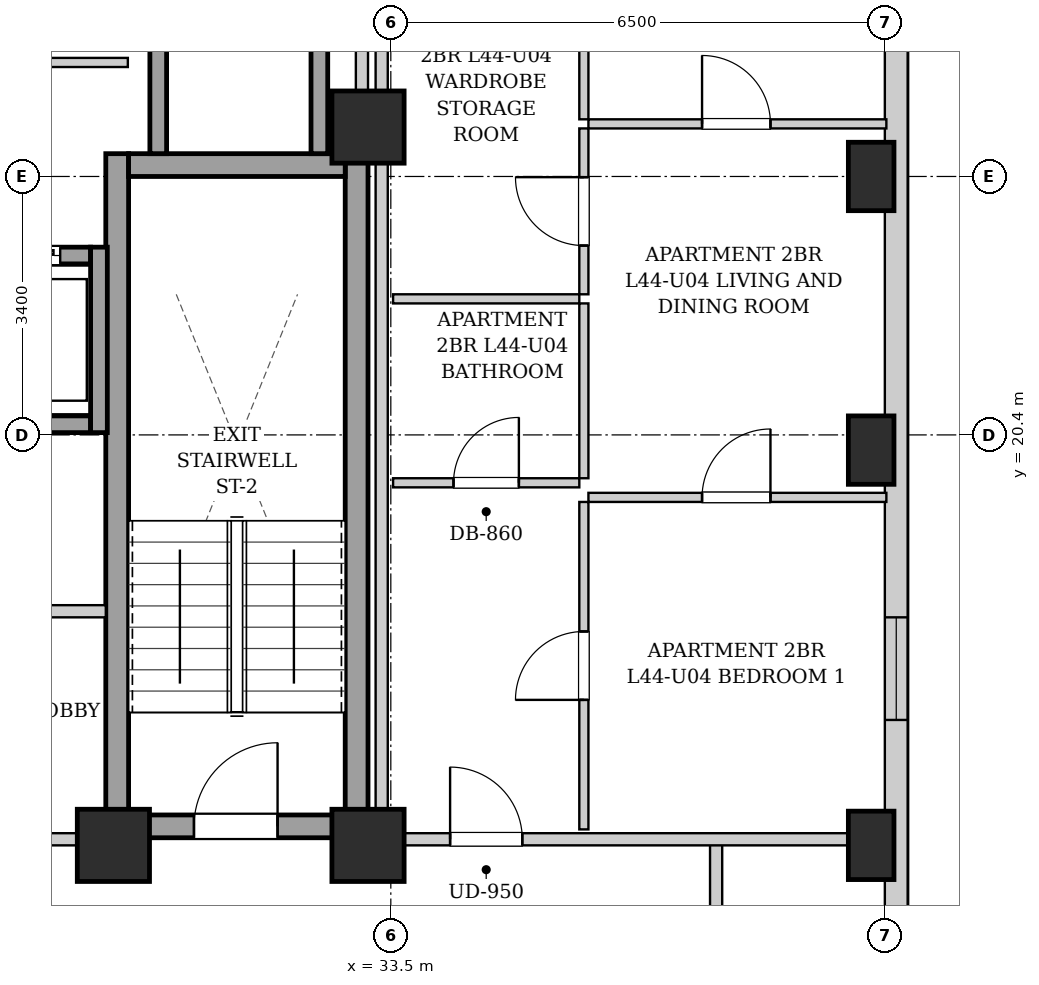
"""IFC4 building model, lengths in metres.
Left out: names, types, materials, properties, quantities, classifications, styles, units other than length and angle.
Written with IfcOpenShell. Run it as: python <this file> out.ifc"""

import sys

from ifc_helpers import new_model, si_unit, direction, frame, frame_2d, origin, origin_2d, place, context, subcontext, project, spatial, rectangle, extrude, element, fill, save


model = new_model("IFC4")
c1 = context("Model", 3, precision=1e-05, world=origin(), true_north=direction((0.0, 1.0)))
c2 = subcontext(c1, "Body", "Model", "MODEL_VIEW")
j1 = project(units=[si_unit("LENGTHUNIT", "METRE"), si_unit("PLANEANGLEUNIT", "RADIAN")], contexts=[c1])
p1 = place(None, origin())
s1 = spatial("IfcSite", under=j1, at=p1, CompositionType="ELEMENT")
p2 = place(p1, origin())
s2 = spatial("IfcBuilding", under=s1, at=p2, CompositionType="ELEMENT")
p3 = place(p2, frame((0.0, 0.0, 153.65)))
s3 = spatial("IfcBuildingStorey", under=s2, at=p3, CompositionType="ELEMENT", Elevation=153.65)
for number, where, z_axis, x_axis in (
    (1, (39.82, 15.0, 0.0), (0.0, 0.0, 1.0), (1.0, 0.0, 0.0)),
    (2, (39.82, 20.2, 0.0), (0.0, 0.0, 1.0), (1.0, 0.0, 0.0)),
    (3, (39.82, 23.8, 0.0), (0.0, 0.0, 1.0), (1.0, 0.0, 0.0)),
):
    element("IfcColumn", number, at=place(p3, frame(where, z_axis=z_axis, x_axis=x_axis)), inside=s3, PredefinedType="COLUMN", context=c2, shape_type="SweptSolid", body=[
        extrude(rectangle(XDim=0.6, YDim=0.9, at=origin_2d()), origin(), (0.0, 0.0, 1.0), 3.25),
    ])
for number, where, z_axis, x_axis in (
    (4, (29.85, 15.0, 0.0), (0.0, 0.0, 1.0), (1.0, 0.0, 0.0)),
    (5, (33.2, 15.0, 0.0), (0.0, 0.0, 1.0), (1.0, 0.0, 0.0)),
    (6, (33.2, 24.45, 0.0), (0.0, 0.0, 1.0), (1.0, 0.0, 0.0)),
):
    element("IfcColumn", number, at=place(p3, frame(where, z_axis=z_axis, x_axis=x_axis)), inside=s3, PredefinedType="COLUMN", context=c2, shape_type="SweptSolid", body=[
        extrude(rectangle(XDim=0.95, YDim=0.95, at=origin_2d()), origin(), (0.0, 0.0, 1.0), 3.25),
    ])
p4 = place(p3, frame((40.15, 40.8, 0.0), z_axis=(0.0, 0.0, 1.0), x_axis=(0.0, -1.0, 0.0)))
e7 = element("IfcWall", 7, at=p4, inside=s3, PredefinedType="SOLIDWALL", context=c2, shape_type="SweptSolid", body=[
    extrude(rectangle(XDim=34.5, YDim=0.3, at=frame_2d((17.25, 0.0))), origin(), (0.0, 0.0, 1.0), 2.99),
])
p5 = place(p4, frame((31.725, 0.0, 0.55)))
e8 = element("IfcOpeningElement", 8, at=p5, cuts=e7, PredefinedType="OPENING", context=c2, shape_type="SweptSolid", body=[
    extrude(rectangle(XDim=1.35, YDim=1.2, at=frame_2d((0.675, 0.6))), frame((0.0, 0.16, 0.0), z_axis=(0.0, -1.0, 0.0), x_axis=(1.0, 0.0, 0.0)), (0.0, 0.0, 1.0), 0.32),
])
p6 = place(p4, frame((22.8, 0.0, 0.55)))
e9 = element("IfcOpeningElement", 9, at=p6, cuts=e7, PredefinedType="OPENING", context=c2, shape_type="SweptSolid", body=[
    extrude(rectangle(XDim=1.35, YDim=1.2, at=frame_2d((0.675, 0.6))), frame((0.0, 0.16, 0.0), z_axis=(0.0, -1.0, 0.0), x_axis=(1.0, 0.0, 0.0)), (0.0, 0.0, 1.0), 0.32),
])
p7 = place(p4, frame((13.425, 0.0, 0.55)))
e10 = element("IfcOpeningElement", 10, at=p7, cuts=e7, PredefinedType="OPENING", context=c2, shape_type="SweptSolid", body=[
    extrude(rectangle(XDim=1.35, YDim=1.2, at=frame_2d((0.675, 0.6))), frame((0.0, 0.16, 0.0), z_axis=(0.0, -1.0, 0.0), x_axis=(1.0, 0.0, 0.0)), (0.0, 0.0, 1.0), 0.32),
])
for number, where, z_axis, x_axis in (
    (11, (29.9, 15.1, 0.0), (0.0, 0.0, 1.0), (0.0, 1.0, 0.0)),
    (12, (33.05, 15.1, 0.0), (0.0, 0.0, 1.0), (0.0, 1.0, 0.0)),
):
    element("IfcWall", number, at=place(p3, frame(where, z_axis=z_axis, x_axis=x_axis)), inside=s3, PredefinedType="SHEAR", context=c2, shape_type="SweptSolid", body=[
        extrude(rectangle(XDim=9.0, YDim=0.3, at=frame_2d((4.5, 0.0))), origin(), (0.0, 0.0, 1.0), 2.99),
    ])
p8 = place(p3, frame((30.05, 23.95, 0.0), z_axis=(0.0, 0.0, 1.0), x_axis=(1.0, 0.0, 0.0)))
e13 = element("IfcWall", 13, at=p8, inside=s3, PredefinedType="SHEAR", context=c2, shape_type="SweptSolid", body=[
    extrude(rectangle(XDim=2.85, YDim=0.3, at=frame_2d((1.425, 0.0))), origin(), (0.0, 0.0, 1.0), 2.99),
])
p9 = place(p3, frame((30.05, 15.25, 0.0), z_axis=(0.0, 0.0, 1.0), x_axis=(1.0, 0.0, 0.0)))
e14 = element("IfcWall", 14, at=p9, inside=s3, PredefinedType="SHEAR", context=c2, shape_type="SweptSolid", body=[
    extrude(rectangle(XDim=2.85, YDim=0.3, at=frame_2d((1.425, 0.0))), origin(), (0.0, 0.0, 1.0), 2.99),
])
p10 = place(p9, frame((0.86, 0.0, 0.0)))
e15 = element("IfcOpeningElement", 15, at=p10, cuts=e14, PredefinedType="OPENING", context=c2, shape_type="SweptSolid", body=[
    extrude(rectangle(XDim=1.1, YDim=2.05, at=frame_2d((0.55, 1.025))), frame((0.0, 0.16, 0.0), z_axis=(0.0, -1.0, 0.0), x_axis=(1.0, 0.0, 0.0)), (0.0, 0.0, 1.0), 0.32),
])
p11 = place(p3, frame((27.65, 20.54, 0.0), z_axis=(0.0, 0.0, 1.0), x_axis=(1.0, 0.0, 0.0)))
e16 = element("IfcWall", 16, at=p11, inside=s3, PredefinedType="SHEAR", context=c2, shape_type="SweptSolid", body=[
    extrude(rectangle(XDim=1.9, YDim=0.22, at=frame_2d((0.95, 0.0))), origin(), (0.0, 0.0, 1.0), 2.99),
])
p12 = place(p3, frame((27.65, 22.76, 0.0), z_axis=(0.0, 0.0, 1.0), x_axis=(1.0, 0.0, 0.0)))
e17 = element("IfcWall", 17, at=p12, inside=s3, PredefinedType="SHEAR", context=c2, shape_type="SweptSolid", body=[
    extrude(rectangle(XDim=1.9, YDim=0.22, at=frame_2d((0.95, 0.0))), origin(), (0.0, 0.0, 1.0), 2.99),
])
p13 = place(p12, frame((0.4, 0.0, 0.0)))
e18 = element("IfcOpeningElement", 18, at=p13, cuts=e17, PredefinedType="OPENING", context=c2, shape_type="SweptSolid", body=[
    extrude(rectangle(XDim=1.1, YDim=2.15, at=frame_2d((0.55, 1.075))), frame((0.0, 0.12, 0.0), z_axis=(0.0, -1.0, 0.0), x_axis=(1.0, 0.0, 0.0)), (0.0, 0.0, 1.0), 0.24),
])
p14 = place(p3, frame((29.66, 20.43, 0.0), z_axis=(0.0, 0.0, 1.0), x_axis=(0.0, 1.0, 0.0)))
e19 = element("IfcWall", 19, at=p14, inside=s3, PredefinedType="SHEAR", context=c2, shape_type="SweptSolid", body=[
    extrude(rectangle(XDim=2.44, YDim=0.22, at=frame_2d((1.22, 0.0))), origin(), (0.0, 0.0, 1.0), 2.99),
])
for number, where, z_axis, x_axis in (
    (20, (30.44, 24.1, 0.0), (0.0, 0.0, 1.0), (0.0, 1.0, 0.0)),
    (21, (32.56, 24.1, 0.0), (0.0, 0.0, 1.0), (0.0, 1.0, 0.0)),
):
    element("IfcWall", number, at=place(p3, frame(where, z_axis=z_axis, x_axis=x_axis)), inside=s3, PredefinedType="SHEAR", context=c2, shape_type="SweptSolid", body=[
        extrude(rectangle(XDim=2.07, YDim=0.22, at=frame_2d((1.035, 0.0))), origin(), (0.0, 0.0, 1.0), 2.99),
    ])
p15 = place(p3, frame((21.25, 15.08, 0.0), z_axis=(0.0, 0.0, 1.0), x_axis=(1.0, 0.0, 0.0)))
e22 = element("IfcWall", 22, at=p15, inside=s3, PredefinedType="PARTITIONING", context=c2, shape_type="SweptSolid", body=[
    extrude(rectangle(XDim=8.5, YDim=0.16, at=frame_2d((4.25, 0.0))), origin(), (0.0, 0.0, 1.0), 2.442),
])
p16 = place(p15, frame((3.725, 0.0, 0.0)))
e23 = element("IfcOpeningElement", 23, at=p16, cuts=e22, PredefinedType="OPENING", context=c2, shape_type="SweptSolid", body=[
    extrude(rectangle(XDim=1.05, YDim=2.05, at=frame_2d((0.525, 1.025))), frame((0.0, 0.09, 0.0), z_axis=(0.0, -1.0, 0.0), x_axis=(1.0, 0.0, 0.0)), (0.0, 0.0, 1.0), 0.18),
])
p17 = place(p3, frame((28.65, 18.08, 0.0), z_axis=(0.0, 0.0, 1.0), x_axis=(1.0, 0.0, 0.0)))
e24 = element("IfcWall", 24, at=p17, inside=s3, PredefinedType="PARTITIONING", context=c2, shape_type="SweptSolid", body=[
    extrude(rectangle(XDim=1.1, YDim=0.16, at=frame_2d((0.55, 0.0))), origin(), (0.0, 0.0, 1.0), 2.99),
])
p18 = place(p3, frame((33.12, 24.12, 0.0), z_axis=(0.0, 0.0, 1.0), x_axis=(0.0, 1.0, 0.0)))
e25 = element("IfcWall", 25, at=p18, inside=s3, PredefinedType="PARTITIONING", context=c2, shape_type="SweptSolid", body=[
    extrude(rectangle(XDim=4.76, YDim=0.16, at=frame_2d((2.38, 0.0))), origin(), (0.0, 0.0, 1.0), 2.99),
])
p19 = place(p3, frame((25.72, 25.3, 0.0), z_axis=(0.0, 0.0, 1.0), x_axis=(1.0, 0.0, 0.0)))
e26 = element("IfcWall", 26, at=p19, inside=s3, PredefinedType="PARTITIONING", context=c2, shape_type="SweptSolid", body=[
    extrude(rectangle(XDim=4.32, YDim=0.12, at=frame_2d((2.16, 0.0))), origin(), (0.0, 0.0, 1.0), 2.99),
])
p20 = place(p19, frame((1.65, 0.0, 0.0)))
e27 = element("IfcOpeningElement", 27, at=p20, cuts=e26, PredefinedType="OPENING", context=c2, shape_type="SweptSolid", body=[
    extrude(rectangle(XDim=0.9, YDim=2.05, at=frame_2d((0.45, 1.025))), frame((0.0, 0.07, 0.0), z_axis=(0.0, -1.0, 0.0), x_axis=(1.0, 0.0, 0.0)), (0.0, 0.0, 1.0), 0.14),
])
p21 = place(p3, frame((37.78, 13.35, 0.0), z_axis=(0.0, 0.0, 1.0), x_axis=(0.0, 1.0, 0.0)))
e28 = element("IfcWall", 28, at=p21, inside=s3, PredefinedType="PARTITIONING", context=c2, shape_type="SweptSolid", body=[
    extrude(rectangle(XDim=1.74, YDim=0.16, at=frame_2d((0.87, 0.0))), origin(), (0.0, 0.0, 1.0), 2.99),
])
p22 = place(p3, frame((33.38, 15.08, 0.0), z_axis=(0.0, 0.0, 1.0), x_axis=(1.0, 0.0, 0.0)))
e29 = element("IfcWall", 29, at=p22, inside=s3, PredefinedType="PARTITIONING", context=c2, shape_type="SweptSolid", body=[
    extrude(rectangle(XDim=6.64, YDim=0.16, at=frame_2d((3.32, 0.0))), origin(), (0.0, 0.0, 1.0), 2.442),
])
p23 = place(p22, frame((0.9, 0.0, 0.0)))
e30 = element("IfcOpeningElement", 30, at=p23, cuts=e29, PredefinedType="OPENING", context=c2, shape_type="SweptSolid", body=[
    extrude(rectangle(XDim=0.95, YDim=2.1, at=frame_2d((0.475, 1.05))), frame((0.0, 0.09, 0.0), z_axis=(0.0, -1.0, 0.0), x_axis=(1.0, 0.0, 0.0)), (0.0, 0.0, 1.0), 0.18),
])
p24 = place(p3, frame((33.53, 22.19, 0.0), z_axis=(0.0, 0.0, 1.0), x_axis=(1.0, 0.0, 0.0)))
e31 = element("IfcWall", 31, at=p24, inside=s3, PredefinedType="PARTITIONING", context=c2, shape_type="SweptSolid", body=[
    extrude(rectangle(XDim=2.45, YDim=0.12, at=frame_2d((1.225, 0.0))), origin(), (0.0, 0.0, 1.0), 2.99),
])
p25 = place(p3, frame((36.04, 22.25, 0.0), z_axis=(0.0, 0.0, 1.0), x_axis=(0.0, 1.0, 0.0)))
e32 = element("IfcWall", 32, at=p25, inside=s3, PredefinedType="PARTITIONING", context=c2, shape_type="SweptSolid", body=[
    extrude(rectangle(XDim=2.182, YDim=0.12, at=frame_2d((1.091, 0.0))), origin(), (0.0, 0.0, 1.0), 2.99),
])
p26 = place(p25, frame((0.641, 0.0, 0.0)))
e33 = element("IfcOpeningElement", 33, at=p26, cuts=e32, PredefinedType="OPENING", context=c2, shape_type="SweptSolid", body=[
    extrude(rectangle(XDim=0.9, YDim=2.05, at=frame_2d((0.45, 1.025))), frame((0.0, 0.07, 0.0), z_axis=(0.0, -1.0, 0.0), x_axis=(1.0, 0.0, 0.0)), (0.0, 0.0, 1.0), 0.14),
])
p27 = place(p3, frame((36.04, 24.552, 0.0), z_axis=(0.0, 0.0, 1.0), x_axis=(0.0, 1.0, 0.0)))
e34 = element("IfcWall", 34, at=p27, inside=s3, PredefinedType="PARTITIONING", context=c2, shape_type="SweptSolid", body=[
    extrude(rectangle(XDim=4.308, YDim=0.12, at=frame_2d((2.154, 0.0))), origin(), (0.0, 0.0, 1.0), 2.99),
])
p28 = place(p27, frame((1.704, 0.0, 0.0)))
e35 = element("IfcOpeningElement", 35, at=p28, cuts=e34, PredefinedType="OPENING", context=c2, shape_type="SweptSolid", body=[
    extrude(rectangle(XDim=0.9, YDim=2.05, at=frame_2d((0.45, 1.025))), frame((0.0, 0.07, 0.0), z_axis=(0.0, -1.0, 0.0), x_axis=(1.0, 0.0, 0.0)), (0.0, 0.0, 1.0), 0.14),
])
p29 = place(p3, frame((33.53, 19.77, 0.0), z_axis=(0.0, 0.0, 1.0), x_axis=(1.0, 0.0, 0.0)))
e36 = element("IfcWall", 36, at=p29, inside=s3, PredefinedType="PARTITIONING", context=c2, shape_type="SweptSolid", body=[
    extrude(rectangle(XDim=2.45, YDim=0.12, at=frame_2d((1.225, 0.0))), origin(), (0.0, 0.0, 1.0), 2.99),
])
p30 = place(p29, frame((0.795, 0.0, 0.0)))
e37 = element("IfcOpeningElement", 37, at=p30, cuts=e36, PredefinedType="OPENING", context=c2, shape_type="SweptSolid", body=[
    extrude(rectangle(XDim=0.86, YDim=2.05, at=frame_2d((0.43, 1.025))), frame((0.0, 0.07, 0.0), z_axis=(0.0, -1.0, 0.0), x_axis=(1.0, 0.0, 0.0)), (0.0, 0.0, 1.0), 0.14),
])
p31 = place(p3, frame((36.04, 19.83, 0.0), z_axis=(0.0, 0.0, 1.0), x_axis=(0.0, 1.0, 0.0)))
e38 = element("IfcWall", 38, at=p31, inside=s3, PredefinedType="PARTITIONING", context=c2, shape_type="SweptSolid", body=[
    extrude(rectangle(XDim=2.3, YDim=0.12, at=frame_2d((1.15, 0.0))), origin(), (0.0, 0.0, 1.0), 2.99),
])
p32 = place(p3, frame((36.04, 15.21, 0.0), z_axis=(0.0, 0.0, 1.0), x_axis=(0.0, 1.0, 0.0)))
e39 = element("IfcWall", 39, at=p32, inside=s3, PredefinedType="PARTITIONING", context=c2, shape_type="SweptSolid", body=[
    extrude(rectangle(XDim=4.308, YDim=0.12, at=frame_2d((2.154, 0.0))), origin(), (0.0, 0.0, 1.0), 2.99),
])
p33 = place(p32, frame((1.704, 0.0, 0.0)))
e40 = element("IfcOpeningElement", 40, at=p33, cuts=e39, PredefinedType="OPENING", context=c2, shape_type="SweptSolid", body=[
    extrude(rectangle(XDim=0.9, YDim=2.05, at=frame_2d((0.45, 1.025))), frame((0.0, 0.07, 0.0), z_axis=(0.0, -1.0, 0.0), x_axis=(1.0, 0.0, 0.0)), (0.0, 0.0, 1.0), 0.14),
])
p34 = place(p3, frame((36.1, 19.578, 0.0), z_axis=(0.0, 0.0, 1.0), x_axis=(1.0, 0.0, 0.0)))
e41 = element("IfcWall", 41, at=p34, inside=s3, PredefinedType="PARTITIONING", context=c2, shape_type="SweptSolid", body=[
    extrude(rectangle(XDim=3.92, YDim=0.12, at=frame_2d((1.96, 0.0))), origin(), (0.0, 0.0, 1.0), 2.99),
])
p35 = place(p34, frame((1.495, 0.0, 0.0)))
e42 = element("IfcOpeningElement", 42, at=p35, cuts=e41, PredefinedType="OPENING", context=c2, shape_type="SweptSolid", body=[
    extrude(rectangle(XDim=0.9, YDim=2.05, at=frame_2d((0.45, 1.025))), frame((0.0, 0.07, 0.0), z_axis=(0.0, -1.0, 0.0), x_axis=(1.0, 0.0, 0.0)), (0.0, 0.0, 1.0), 0.14),
])
p36 = place(p3, frame((36.1, 24.492, 0.0), z_axis=(0.0, 0.0, 1.0), x_axis=(1.0, 0.0, 0.0)))
e43 = element("IfcWall", 43, at=p36, inside=s3, PredefinedType="PARTITIONING", context=c2, shape_type="SweptSolid", body=[
    extrude(rectangle(XDim=3.92, YDim=0.12, at=frame_2d((1.96, 0.0))), origin(), (0.0, 0.0, 1.0), 2.621),
])
p37 = place(p36, frame((1.495, 0.0, 0.0)))
e44 = element("IfcOpeningElement", 44, at=p37, cuts=e43, PredefinedType="OPENING", context=c2, shape_type="SweptSolid", body=[
    extrude(rectangle(XDim=0.9, YDim=2.05, at=frame_2d((0.45, 1.025))), frame((0.0, 0.07, 0.0), z_axis=(0.0, -1.0, 0.0), x_axis=(1.0, 0.0, 0.0)), (0.0, 0.0, 1.0), 0.14),
])
p38 = place(p3, frame((33.38, 15.02, 0.0), z_axis=(0.0, 0.0, 1.0), x_axis=(0.0, 1.0, 0.0)))
e45 = element("IfcWall", 45, at=p38, inside=s3, PredefinedType="PARTITIONING", context=c2, shape_type="SweptSolid", body=[
    extrude(rectangle(XDim=13.98, YDim=0.16, at=frame_2d((6.99, 0.0))), origin(), (0.0, 0.0, 1.0), 2.99),
])
p39 = place(p10, origin())
e46 = element("IfcDoor", 46, at=p39, inside=s3, OperationType="SINGLE_SWING_RIGHT", PredefinedType="DOOR", context=c2, shape_type="SweptSolid", body=[
    extrude(rectangle(XDim=1.1, YDim=2.05, at=frame_2d((0.55, 1.025))), frame((0.0, 0.025, 0.0), z_axis=(0.0, -1.0, 0.0), x_axis=(1.0, 0.0, 0.0)), (0.0, 0.0, 1.0), 0.05),
])
fill(e15, e46)
p40 = place(p13, origin())
e47 = element("IfcDoor", 47, at=p40, inside=s3, OperationType="SLIDING_TO_LEFT", PredefinedType="DOOR", context=c2, shape_type="SweptSolid", body=[
    extrude(rectangle(XDim=1.1, YDim=2.15, at=frame_2d((0.55, 1.075))), frame((0.0, 0.025, 0.0), z_axis=(0.0, -1.0, 0.0), x_axis=(1.0, 0.0, 0.0)), (0.0, 0.0, 1.0), 0.05),
])
fill(e18, e47)
p41 = place(p23, origin())
e48 = element("IfcDoor", 48, at=p41, inside=s3, OperationType="SINGLE_SWING_LEFT", PredefinedType="DOOR", context=c2, shape_type="SweptSolid", body=[
    extrude(rectangle(XDim=0.95, YDim=2.1, at=frame_2d((0.475, 1.05))), frame((0.0, 0.025, 0.0), z_axis=(0.0, -1.0, 0.0), x_axis=(1.0, 0.0, 0.0)), (0.0, 0.0, 1.0), 0.05),
])
fill(e30, e48)
p42 = place(p26, origin())
e49 = element("IfcDoor", 49, at=p42, inside=s3, OperationType="SINGLE_SWING_RIGHT", PredefinedType="DOOR", context=c2, shape_type="SweptSolid", body=[
    extrude(rectangle(XDim=0.9, YDim=2.05, at=frame_2d((0.45, 1.025))), frame((0.0, 0.025, 0.0), z_axis=(0.0, -1.0, 0.0), x_axis=(1.0, 0.0, 0.0)), (0.0, 0.0, 1.0), 0.05),
])
fill(e33, e49)
p43 = place(p30, origin())
e50 = element("IfcDoor", 50, at=p43, inside=s3, OperationType="SINGLE_SWING_RIGHT", PredefinedType="DOOR", context=c2, shape_type="SweptSolid", body=[
    extrude(rectangle(XDim=0.86, YDim=2.05, at=frame_2d((0.43, 1.025))), frame((0.0, 0.025, 0.0), z_axis=(0.0, -1.0, 0.0), x_axis=(1.0, 0.0, 0.0)), (0.0, 0.0, 1.0), 0.05),
])
fill(e37, e50)
p44 = place(p33, origin())
e51 = element("IfcDoor", 51, at=p44, inside=s3, OperationType="SINGLE_SWING_LEFT", PredefinedType="DOOR", context=c2, shape_type="SweptSolid", body=[
    extrude(rectangle(XDim=0.9, YDim=2.05, at=frame_2d((0.45, 1.025))), frame((0.0, 0.025, 0.0), z_axis=(0.0, -1.0, 0.0), x_axis=(1.0, 0.0, 0.0)), (0.0, 0.0, 1.0), 0.05),
])
fill(e40, e51)
p45 = place(p35, origin())
e52 = element("IfcDoor", 52, at=p45, inside=s3, OperationType="SINGLE_SWING_RIGHT", PredefinedType="DOOR", context=c2, shape_type="SweptSolid", body=[
    extrude(rectangle(XDim=0.9, YDim=2.05, at=frame_2d((0.45, 1.025))), frame((0.0, 0.025, 0.0), z_axis=(0.0, -1.0, 0.0), x_axis=(1.0, 0.0, 0.0)), (0.0, 0.0, 1.0), 0.05),
])
fill(e42, e52)
p46 = place(p37, origin())
e53 = element("IfcDoor", 53, at=p46, inside=s3, OperationType="SINGLE_SWING_LEFT", PredefinedType="DOOR", context=c2, shape_type="SweptSolid", body=[
    extrude(rectangle(XDim=0.9, YDim=2.05, at=frame_2d((0.45, 1.025))), frame((0.0, 0.025, 0.0), z_axis=(0.0, -1.0, 0.0), x_axis=(1.0, 0.0, 0.0)), (0.0, 0.0, 1.0), 0.05),
])
fill(e44, e53)
p47 = place(p6, origin())
e54 = element("IfcWindow", 54, at=p47, inside=s3, PartitioningType="SINGLE_PANEL", PredefinedType="WINDOW", context=c2, shape_type="SweptSolid", body=[
    extrude(rectangle(XDim=1.35, YDim=1.2, at=frame_2d((0.675, 0.6))), frame((0.0, 0.03, 0.0), z_axis=(0.0, -1.0, 0.0), x_axis=(1.0, 0.0, 0.0)), (0.0, 0.0, 1.0), 0.06),
])
fill(e9, e54)
save(model, sys.argv[1])
